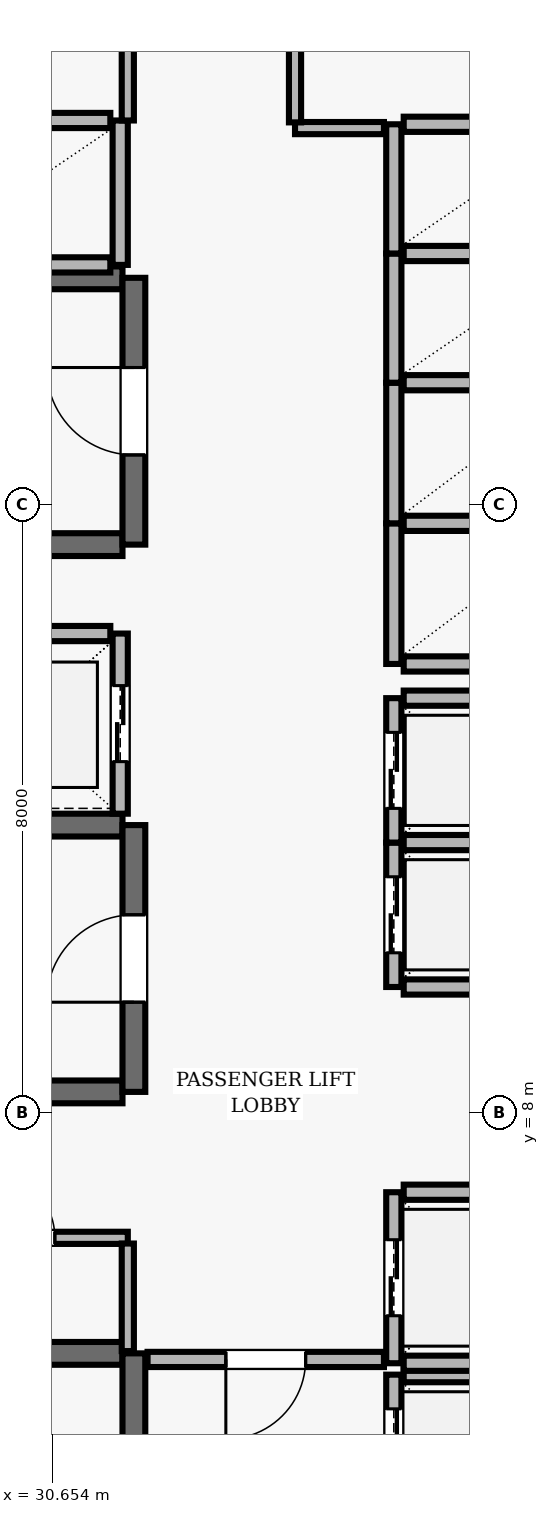
"""IFC4 building model, lengths in metres.
Left out: names, types, materials, properties, quantities, classifications, styles, units other than length and angle.
Written with IfcOpenShell. Run it as: python <this file> out.ifc"""

import sys

from ifc_helpers import new_model, si_unit, direction, frame, frame_2d, origin, place, context, subcontext, project, spatial, rectangle, extrude, element, fill, save


model = new_model("IFC4")
c1 = context("Model", 3, precision=1e-05, world=origin(), true_north=direction((0.0, 1.0)))
c2 = subcontext(c1, "Body", "Model", "MODEL_VIEW")
j1 = project(units=[si_unit("LENGTHUNIT", "METRE"), si_unit("PLANEANGLEUNIT", "RADIAN")], contexts=[c1])
p1 = place(None, origin())
s1 = spatial("IfcSite", under=j1, at=p1, CompositionType="ELEMENT")
p2 = place(p1, origin())
s2 = spatial("IfcBuilding", under=s1, at=p2, CompositionType="ELEMENT")
p3 = place(p2, frame((0.0, 0.0, 175.8)))
s3 = spatial("IfcBuildingStorey", under=s2, at=p3, CompositionType="ELEMENT", Elevation=175.8)
p4 = place(p3, frame((31.58, 4.83, 0.0), z_axis=(0.0, 0.0, 1.0), x_axis=(-1.0, 0.0, 0.0)))
e1 = element("IfcWall", 1, at=p4, inside=s3, PredefinedType="SHEAR", context=c2, shape_type="SweptSolid", body=[
    extrude(rectangle(XDim=8.36, YDim=0.3, at=frame_2d((4.18, 0.0))), origin(), (0.0, 0.0, 1.0), 3.69),
])
p5 = place(p3, frame((31.73, 0.96, 0.0), z_axis=(0.0, 0.0, 1.0), x_axis=(0.0, 1.0, 0.0)))
e2 = element("IfcWall", 2, at=p5, inside=s3, PredefinedType="SHEAR", context=c2, shape_type="SweptSolid", body=[
    extrude(rectangle(XDim=3.87, YDim=0.3, at=frame_2d((1.935, 0.0))), origin(), (0.0, 0.0, 1.0), 3.69),
])
p6 = place(p5, frame((1.54, 0.0, 0.0)))
e3 = element("IfcOpeningElement", 3, at=p6, cuts=e2, PredefinedType="OPENING", context=c2, shape_type="SweptSolid", body=[
    extrude(rectangle(XDim=1.15, YDim=2.15, at=frame_2d((0.575, 1.075))), frame((0.0, 0.16, 0.0), z_axis=(0.0, -1.0, 0.0), x_axis=(1.0, 0.0, 0.0)), (0.0, 0.0, 1.0), 0.32),
])
for number, where, z_axis, x_axis in (
    (4, (31.58, 18.98, 0.0), (0.0, 0.0, 1.0), (-1.0, 0.0, 0.0)),
    (5, (23.22, 15.47, 0.0), (0.0, 0.0, 1.0), (1.0, 0.0, 0.0)),
):
    element("IfcWall", number, at=place(p3, frame(where, z_axis=z_axis, x_axis=x_axis)), inside=s3, PredefinedType="SHEAR", context=c2, shape_type="SweptSolid", body=[
        extrude(rectangle(XDim=8.36, YDim=0.3, at=frame_2d((4.18, 0.0))), origin(), (0.0, 0.0, 1.0), 3.69),
    ])
p7 = place(p3, frame((31.73, 15.47, 0.0), z_axis=(0.0, 0.0, 1.0), x_axis=(0.0, 1.0, 0.0)))
e6 = element("IfcWall", 6, at=p7, inside=s3, PredefinedType="SHEAR", context=c2, shape_type="SweptSolid", body=[
    extrude(rectangle(XDim=3.51, YDim=0.3, at=frame_2d((1.755, 0.0))), origin(), (0.0, 0.0, 1.0), 3.69),
])
p8 = place(p7, frame((1.18, 0.0, 0.0)))
e7 = element("IfcOpeningElement", 7, at=p8, cuts=e6, PredefinedType="OPENING", context=c2, shape_type="SweptSolid", body=[
    extrude(rectangle(XDim=1.15, YDim=2.15, at=frame_2d((0.575, 1.075))), frame((0.0, 0.16, 0.0), z_axis=(0.0, -1.0, 0.0), x_axis=(1.0, 0.0, 0.0)), (0.0, 0.0, 1.0), 0.32),
])
for number, where, z_axis, x_axis in (
    (8, (31.58, 11.78, 0.0), (0.0, 0.0, 1.0), (-1.0, 0.0, 0.0)),
    (9, (23.22, 8.27, 0.0), (0.0, 0.0, 1.0), (1.0, 0.0, 0.0)),
):
    element("IfcWall", number, at=place(p3, frame(where, z_axis=z_axis, x_axis=x_axis)), inside=s3, PredefinedType="SHEAR", context=c2, shape_type="SweptSolid", body=[
        extrude(rectangle(XDim=8.36, YDim=0.3, at=frame_2d((4.18, 0.0))), origin(), (0.0, 0.0, 1.0), 3.69),
    ])
p9 = place(p3, frame((31.73, 8.27, 0.0), z_axis=(0.0, 0.0, 1.0), x_axis=(0.0, 1.0, 0.0)))
e10 = element("IfcWall", 10, at=p9, inside=s3, PredefinedType="SHEAR", context=c2, shape_type="SweptSolid", body=[
    extrude(rectangle(XDim=3.51, YDim=0.3, at=frame_2d((1.755, 0.0))), origin(), (0.0, 0.0, 1.0), 3.69),
])
p10 = place(p9, frame((1.18, 0.0, 0.0)))
e11 = element("IfcOpeningElement", 11, at=p10, cuts=e10, PredefinedType="OPENING", context=c2, shape_type="SweptSolid", body=[
    extrude(rectangle(XDim=1.15, YDim=2.15, at=frame_2d((0.575, 1.075))), frame((0.0, 0.16, 0.0), z_axis=(0.0, -1.0, 0.0), x_axis=(1.0, 0.0, 0.0)), (0.0, 0.0, 1.0), 0.32),
])
p11 = place(p3, frame((35.15, 4.55, 0.0), z_axis=(0.0, 0.0, 1.0), x_axis=(0.0, -1.0, 0.0)))
e12 = element("IfcWall", 12, at=p11, inside=s3, PredefinedType="SOLIDWALL", context=c2, shape_type="SweptSolid", body=[
    extrude(rectangle(XDim=2.1, YDim=0.2, at=frame_2d((1.05, 0.0))), origin(), (0.0, 0.0, 1.0), 3.69),
])
p12 = place(p11, frame((0.45, 0.0, 0.0)))
e13 = element("IfcOpeningElement", 13, at=p12, cuts=e12, PredefinedType="OPENING", context=c2, shape_type="SweptSolid", body=[
    extrude(rectangle(XDim=1.2, YDim=2.15, at=frame_2d((0.6, 1.075))), frame((0.0, 0.11, 0.0), z_axis=(0.0, -1.0, 0.0), x_axis=(1.0, 0.0, 0.0)), (0.0, 0.0, 1.0), 0.22),
])
p13 = place(p3, frame((37.42, 4.55, 0.0), z_axis=(0.0, 0.0, 1.0), x_axis=(-1.0, 0.0, 0.0)))
e14 = element("IfcWall", 14, at=p13, inside=s3, PredefinedType="SOLIDWALL", context=c2, shape_type="SweptSolid", body=[
    extrude(rectangle(XDim=2.14, YDim=0.2, at=frame_2d((1.07, 0.0))), origin(), (0.0, 0.0, 1.0), 3.69),
])
p14 = place(p3, frame((35.15, 6.95, 0.0), z_axis=(0.0, 0.0, 1.0), x_axis=(0.0, -1.0, 0.0)))
e15 = element("IfcWall", 15, at=p14, inside=s3, PredefinedType="SOLIDWALL", context=c2, shape_type="SweptSolid", body=[
    extrude(rectangle(XDim=2.25, YDim=0.2, at=frame_2d((1.125, 0.0))), origin(), (0.0, 0.0, 1.0), 3.69),
])
p15 = place(p14, frame((0.625, 0.0, 0.0)))
e16 = element("IfcOpeningElement", 16, at=p15, cuts=e15, PredefinedType="OPENING", context=c2, shape_type="SweptSolid", body=[
    extrude(rectangle(XDim=1.0, YDim=2.1, at=frame_2d((0.5, 1.05))), frame((0.0, 0.11, 0.0), z_axis=(0.0, -1.0, 0.0), x_axis=(1.0, 0.0, 0.0)), (0.0, 0.0, 1.0), 0.22),
])
for number, where, z_axis, x_axis in (
    (17, (35.28, 4.7, 0.0), (0.0, 0.0, 1.0), (1.0, 0.0, 0.0)),
    (18, (37.42, 6.95, 0.0), (0.0, 0.0, 1.0), (-1.0, 0.0, 0.0)),
):
    element("IfcWall", number, at=place(p3, frame(where, z_axis=z_axis, x_axis=x_axis)), inside=s3, PredefinedType="SOLIDWALL", context=c2, shape_type="SweptSolid", body=[
        extrude(rectangle(XDim=2.14, YDim=0.2, at=frame_2d((1.07, 0.0))), origin(), (0.0, 0.0, 1.0), 3.69),
    ])
p16 = place(p3, frame((35.15, 11.55, 0.0), z_axis=(0.0, 0.0, 1.0), x_axis=(0.0, -1.0, 0.0)))
e19 = element("IfcWall", 19, at=p16, inside=s3, PredefinedType="SOLIDWALL", context=c2, shape_type="SweptSolid", body=[
    extrude(rectangle(XDim=1.9, YDim=0.2, at=frame_2d((0.95, 0.0))), origin(), (0.0, 0.0, 1.0), 3.69),
])
p17 = place(p16, frame((0.45, 0.0, 0.0)))
e20 = element("IfcOpeningElement", 20, at=p17, cuts=e19, PredefinedType="OPENING", context=c2, shape_type="SweptSolid", body=[
    extrude(rectangle(XDim=1.0, YDim=2.1, at=frame_2d((0.5, 1.05))), frame((0.0, 0.11, 0.0), z_axis=(0.0, -1.0, 0.0), x_axis=(1.0, 0.0, 0.0)), (0.0, 0.0, 1.0), 0.22),
])
for number, where, z_axis, x_axis in (
    (21, (35.28, 9.65, 0.0), (0.0, 0.0, 1.0), (1.0, 0.0, 0.0)),
    (22, (37.42, 11.55, 0.0), (0.0, 0.0, 1.0), (-1.0, 0.0, 0.0)),
):
    element("IfcWall", number, at=place(p3, frame(where, z_axis=z_axis, x_axis=x_axis)), inside=s3, PredefinedType="SOLIDWALL", context=c2, shape_type="SweptSolid", body=[
        extrude(rectangle(XDim=2.14, YDim=0.2, at=frame_2d((1.07, 0.0))), origin(), (0.0, 0.0, 1.0), 3.69),
    ])
p18 = place(p3, frame((35.15, 13.45, 0.0), z_axis=(0.0, 0.0, 1.0), x_axis=(0.0, -1.0, 0.0)))
e23 = element("IfcWall", 23, at=p18, inside=s3, PredefinedType="SOLIDWALL", context=c2, shape_type="SweptSolid", body=[
    extrude(rectangle(XDim=1.9, YDim=0.2, at=frame_2d((0.95, 0.0))), origin(), (0.0, 0.0, 1.0), 3.69),
])
p19 = place(p18, frame((0.45, 0.0, 0.0)))
e24 = element("IfcOpeningElement", 24, at=p19, cuts=e23, PredefinedType="OPENING", context=c2, shape_type="SweptSolid", body=[
    extrude(rectangle(XDim=1.0, YDim=2.1, at=frame_2d((0.5, 1.05))), frame((0.0, 0.11, 0.0), z_axis=(0.0, -1.0, 0.0), x_axis=(1.0, 0.0, 0.0)), (0.0, 0.0, 1.0), 0.22),
])
p20 = place(p3, frame((37.42, 13.45, 0.0), z_axis=(0.0, 0.0, 1.0), x_axis=(-1.0, 0.0, 0.0)))
e25 = element("IfcWall", 25, at=p20, inside=s3, PredefinedType="SOLIDWALL", context=c2, shape_type="SweptSolid", body=[
    extrude(rectangle(XDim=2.14, YDim=0.2, at=frame_2d((1.07, 0.0))), origin(), (0.0, 0.0, 1.0), 3.69),
])
p21 = place(p3, frame((31.55, 11.93, 0.0), z_axis=(0.0, 0.0, 1.0), x_axis=(0.0, 1.0, 0.0)))
e26 = element("IfcWall", 26, at=p21, inside=s3, PredefinedType="SOLIDWALL", context=c2, shape_type="SweptSolid", body=[
    extrude(rectangle(XDim=2.37, YDim=0.2, at=frame_2d((1.185, 0.0))), origin(), (0.0, 0.0, 1.0), 3.69),
])
p22 = place(p21, frame((0.685, 0.0, 0.0)))
e27 = element("IfcOpeningElement", 27, at=p22, cuts=e26, PredefinedType="OPENING", context=c2, shape_type="SweptSolid", body=[
    extrude(rectangle(XDim=1.0, YDim=2.1, at=frame_2d((0.5, 1.05))), frame((0.0, 0.11, 0.0), z_axis=(0.0, -1.0, 0.0), x_axis=(1.0, 0.0, 0.0)), (0.0, 0.0, 1.0), 0.22),
])
p23 = place(p3, frame((31.42, 14.3, 0.0), z_axis=(0.0, 0.0, 1.0), x_axis=(-1.0, 0.0, 0.0)))
e28 = element("IfcWall", 28, at=p23, inside=s3, PredefinedType="SOLIDWALL", context=c2, shape_type="SweptSolid", body=[
    extrude(rectangle(XDim=2.44, YDim=0.2, at=frame_2d((1.22, 0.0))), origin(), (0.0, 0.0, 1.0), 3.69),
])
p24 = place(p3, frame((35.15, 15.75, 0.0), z_axis=(0.0, 0.0, 1.0), x_axis=(0.0, -1.0, 0.0)))
e29 = element("IfcWall", 29, at=p24, inside=s3, PredefinedType="SOLIDWALL", context=c2, shape_type="SweptSolid", body=[
    extrude(rectangle(XDim=1.85, YDim=0.2, at=frame_2d((0.925, 0.0))), origin(), (0.0, 0.0, 1.0), 3.69),
])
for number, where, z_axis, x_axis in (
    (30, (35.28, 13.9, 0.0), (0.0, 0.0, 1.0), (1.0, 0.0, 0.0)),
    (31, (37.42, 15.75, 0.0), (0.0, 0.0, 1.0), (-1.0, 0.0, 0.0)),
):
    element("IfcWall", number, at=place(p3, frame(where, z_axis=z_axis, x_axis=x_axis)), inside=s3, PredefinedType="SOLIDWALL", context=c2, shape_type="SweptSolid", body=[
        extrude(rectangle(XDim=2.14, YDim=0.2, at=frame_2d((1.07, 0.0))), origin(), (0.0, 0.0, 1.0), 3.69),
    ])
p25 = place(p3, frame((35.15, 17.6, 0.0), z_axis=(0.0, 0.0, 1.0), x_axis=(0.0, -1.0, 0.0)))
e32 = element("IfcWall", 32, at=p25, inside=s3, PredefinedType="SOLIDWALL", context=c2, shape_type="SweptSolid", body=[
    extrude(rectangle(XDim=1.85, YDim=0.2, at=frame_2d((0.925, 0.0))), origin(), (0.0, 0.0, 1.0), 3.69),
])
p26 = place(p3, frame((37.42, 17.6, 0.0), z_axis=(0.0, 0.0, 1.0), x_axis=(-1.0, 0.0, 0.0)))
e33 = element("IfcWall", 33, at=p26, inside=s3, PredefinedType="SOLIDWALL", context=c2, shape_type="SweptSolid", body=[
    extrude(rectangle(XDim=2.14, YDim=0.2, at=frame_2d((1.07, 0.0))), origin(), (0.0, 0.0, 1.0), 3.69),
])
p27 = place(p3, frame((35.15, 19.3, 0.0), z_axis=(0.0, 0.0, 1.0), x_axis=(0.0, -1.0, 0.0)))
e34 = element("IfcWall", 34, at=p27, inside=s3, PredefinedType="SOLIDWALL", context=c2, shape_type="SweptSolid", body=[
    extrude(rectangle(XDim=1.7, YDim=0.2, at=frame_2d((0.85, 0.0))), origin(), (0.0, 0.0, 1.0), 3.69),
])
p28 = place(p3, frame((37.42, 19.3, 0.0), z_axis=(0.0, 0.0, 1.0), x_axis=(-1.0, 0.0, 0.0)))
e35 = element("IfcWall", 35, at=p28, inside=s3, PredefinedType="SOLIDWALL", context=c2, shape_type="SweptSolid", body=[
    extrude(rectangle(XDim=2.14, YDim=0.2, at=frame_2d((1.07, 0.0))), origin(), (0.0, 0.0, 1.0), 3.69),
])
p29 = place(p3, frame((35.15, 21.0, 0.0), z_axis=(0.0, 0.0, 1.0), x_axis=(0.0, -1.0, 0.0)))
e36 = element("IfcWall", 36, at=p29, inside=s3, PredefinedType="SOLIDWALL", context=c2, shape_type="SweptSolid", body=[
    extrude(rectangle(XDim=1.7, YDim=0.2, at=frame_2d((0.85, 0.0))), origin(), (0.0, 0.0, 1.0), 3.69),
])
p30 = place(p3, frame((37.42, 21.0, 0.0), z_axis=(0.0, 0.0, 1.0), x_axis=(-1.0, 0.0, 0.0)))
e37 = element("IfcWall", 37, at=p30, inside=s3, PredefinedType="SOLIDWALL", context=c2, shape_type="SweptSolid", body=[
    extrude(rectangle(XDim=2.14, YDim=0.2, at=frame_2d((1.07, 0.0))), origin(), (0.0, 0.0, 1.0), 3.69),
])
p31 = place(p3, frame((31.55, 19.15, 0.0), z_axis=(0.0, 0.0, 1.0), x_axis=(0.0, 1.0, 0.0)))
e38 = element("IfcWall", 38, at=p31, inside=s3, PredefinedType="SOLIDWALL", context=c2, shape_type="SweptSolid", body=[
    extrude(rectangle(XDim=1.9, YDim=0.2, at=frame_2d((0.95, 0.0))), origin(), (0.0, 0.0, 1.0), 3.69),
])
for number, where, z_axis, x_axis in (
    (39, (28.98, 19.15, 0.0), (0.0, 0.0, 1.0), (1.0, 0.0, 0.0)),
    (40, (31.42, 21.05, 0.0), (0.0, 0.0, 1.0), (-1.0, 0.0, 0.0)),
):
    element("IfcWall", number, at=place(p3, frame(where, z_axis=z_axis, x_axis=x_axis)), inside=s3, PredefinedType="SOLIDWALL", context=c2, shape_type="SweptSolid", body=[
        extrude(rectangle(XDim=2.44, YDim=0.2, at=frame_2d((1.22, 0.0))), origin(), (0.0, 0.0, 1.0), 3.69),
    ])
p32 = place(p3, frame((28.85, 6.35, 0.0), z_axis=(0.0, 0.0, 1.0), x_axis=(1.0, 0.0, 0.0)))
e41 = element("IfcWall", 41, at=p32, inside=s3, PredefinedType="PARTITIONING", context=c2, shape_type="SweptSolid", body=[
    extrude(rectangle(XDim=2.8, YDim=0.16, at=frame_2d((1.4, 0.0))), origin(), (0.0, 0.0, 1.0), 3.69),
])
p33 = place(p32, frame((0.96, 0.0, 0.0)))
e42 = element("IfcOpeningElement", 42, at=p33, cuts=e41, PredefinedType="OPENING", context=c2, shape_type="SweptSolid", body=[
    extrude(rectangle(XDim=0.88, YDim=2.1, at=frame_2d((0.44, 1.05))), frame((0.0, 0.09, 0.0), z_axis=(0.0, -1.0, 0.0), x_axis=(1.0, 0.0, 0.0)), (0.0, 0.0, 1.0), 0.18),
])
p34 = place(p3, frame((35.02, 4.75, 0.0), z_axis=(0.0, 0.0, 1.0), x_axis=(-1.0, 0.0, 0.0)))
e43 = element("IfcWall", 43, at=p34, inside=s3, PredefinedType="SOLIDWALL", context=c2, shape_type="SweptSolid", body=[
    extrude(rectangle(XDim=3.11, YDim=0.2, at=frame_2d((1.555, 0.0))), origin(), (0.0, 0.0, 1.0), 3.69),
])
p35 = place(p34, frame((1.03, 0.0, 0.0)))
e44 = element("IfcOpeningElement", 44, at=p35, cuts=e43, PredefinedType="OPENING", context=c2, shape_type="SweptSolid", body=[
    extrude(rectangle(XDim=1.05, YDim=2.15, at=frame_2d((0.525, 1.075))), frame((0.0, 0.11, 0.0), z_axis=(0.0, -1.0, 0.0), x_axis=(1.0, 0.0, 0.0)), (0.0, 0.0, 1.0), 0.22),
])
p36 = place(p3, frame((35.02, 20.95, 0.0), z_axis=(0.0, 0.0, 1.0), x_axis=(-1.0, 0.0, 0.0)))
e45 = element("IfcWall", 45, at=p36, inside=s3, PredefinedType="PARTITIONING", context=c2, shape_type="SweptSolid", body=[
    extrude(rectangle(XDim=1.17, YDim=0.16, at=frame_2d((0.585, 0.0))), origin(), (0.0, 0.0, 1.0), 3.69),
])
p37 = place(p3, frame((31.65, 4.86, 0.0), z_axis=(0.0, 0.0, 1.0), x_axis=(0.0, 1.0, 0.0)))
e46 = element("IfcWall", 46, at=p37, inside=s3, PredefinedType="PARTITIONING", context=c2, shape_type="SweptSolid", body=[
    extrude(rectangle(XDim=1.415, YDim=0.16, at=frame_2d((0.708, 0.0))), origin(), (0.0, 0.0, 1.0), 3.69),
])
p38 = place(p3, frame((31.65, 23.775, 0.0), z_axis=(0.0, 0.0, 1.0), x_axis=(0.0, -1.0, 0.0)))
e47 = element("IfcWall", 47, at=p38, inside=s3, PredefinedType="PARTITIONING", context=c2, shape_type="SweptSolid", body=[
    extrude(rectangle(XDim=2.725, YDim=0.16, at=frame_2d((1.362, 0.0))), origin(), (0.0, 0.0, 1.0), 3.69),
])
p39 = place(p3, frame((33.85, 21.025, 0.0), z_axis=(0.0, 0.0, 1.0), x_axis=(0.0, 1.0, 0.0)))
e48 = element("IfcWall", 48, at=p39, inside=s3, PredefinedType="PARTITIONING", context=c2, shape_type="SweptSolid", body=[
    extrude(rectangle(XDim=2.75, YDim=0.16, at=frame_2d((1.375, 0.0))), origin(), (0.0, 0.0, 1.0), 3.69),
])
p40 = place(p8, origin())
e49 = element("IfcDoor", 49, at=p40, inside=s3, OperationType="SINGLE_SWING_RIGHT", PredefinedType="DOOR", context=c2, shape_type="SweptSolid", body=[
    extrude(rectangle(XDim=1.15, YDim=2.15, at=frame_2d((0.575, 1.075))), frame((0.0, 0.025, 0.0), z_axis=(0.0, -1.0, 0.0), x_axis=(1.0, 0.0, 0.0)), (0.0, 0.0, 1.0), 0.05),
])
fill(e7, e49)
p41 = place(p10, origin())
e50 = element("IfcDoor", 50, at=p41, inside=s3, OperationType="SINGLE_SWING_LEFT", PredefinedType="DOOR", context=c2, shape_type="SweptSolid", body=[
    extrude(rectangle(XDim=1.15, YDim=2.15, at=frame_2d((0.575, 1.075))), frame((0.0, 0.025, 0.0), z_axis=(0.0, -1.0, 0.0), x_axis=(1.0, 0.0, 0.0)), (0.0, 0.0, 1.0), 0.05),
])
fill(e11, e50)
p42 = place(p12, origin())
e51 = element("IfcDoor", 51, at=p42, inside=s3, OperationType="DOUBLE_DOOR_SLIDING", PredefinedType="DOOR", context=c2, shape_type="SweptSolid", body=[
    extrude(rectangle(XDim=1.2, YDim=2.15, at=frame_2d((0.6, 1.075))), frame((0.0, 0.025, 0.0), z_axis=(0.0, -1.0, 0.0), x_axis=(1.0, 0.0, 0.0)), (0.0, 0.0, 1.0), 0.05),
])
fill(e13, e51)
p43 = place(p15, origin())
e52 = element("IfcDoor", 52, at=p43, inside=s3, OperationType="DOUBLE_DOOR_SLIDING", PredefinedType="DOOR", context=c2, shape_type="SweptSolid", body=[
    extrude(rectangle(XDim=1.0, YDim=2.1, at=frame_2d((0.5, 1.05))), frame((0.0, 0.025, 0.0), z_axis=(0.0, -1.0, 0.0), x_axis=(1.0, 0.0, 0.0)), (0.0, 0.0, 1.0), 0.05),
])
fill(e16, e52)
p44 = place(p17, origin())
e53 = element("IfcDoor", 53, at=p44, inside=s3, OperationType="DOUBLE_DOOR_SLIDING", PredefinedType="DOOR", context=c2, shape_type="SweptSolid", body=[
    extrude(rectangle(XDim=1.0, YDim=2.1, at=frame_2d((0.5, 1.05))), frame((0.0, 0.025, 0.0), z_axis=(0.0, -1.0, 0.0), x_axis=(1.0, 0.0, 0.0)), (0.0, 0.0, 1.0), 0.05),
])
fill(e20, e53)
p45 = place(p19, origin())
e54 = element("IfcDoor", 54, at=p45, inside=s3, OperationType="DOUBLE_DOOR_SLIDING", PredefinedType="DOOR", context=c2, shape_type="SweptSolid", body=[
    extrude(rectangle(XDim=1.0, YDim=2.1, at=frame_2d((0.5, 1.05))), frame((0.0, 0.025, 0.0), z_axis=(0.0, -1.0, 0.0), x_axis=(1.0, 0.0, 0.0)), (0.0, 0.0, 1.0), 0.05),
])
fill(e24, e54)
p46 = place(p22, origin())
e55 = element("IfcDoor", 55, at=p46, inside=s3, OperationType="DOUBLE_DOOR_SLIDING", PredefinedType="DOOR", context=c2, shape_type="SweptSolid", body=[
    extrude(rectangle(XDim=1.0, YDim=2.1, at=frame_2d((0.5, 1.05))), frame((0.0, 0.025, 0.0), z_axis=(0.0, -1.0, 0.0), x_axis=(1.0, 0.0, 0.0)), (0.0, 0.0, 1.0), 0.05),
])
fill(e27, e55)
p47 = place(p35, origin())
e56 = element("IfcDoor", 56, at=p47, inside=s3, OperationType="SINGLE_SWING_RIGHT", PredefinedType="DOOR", context=c2, shape_type="SweptSolid", body=[
    extrude(rectangle(XDim=1.05, YDim=2.15, at=frame_2d((0.525, 1.075))), frame((0.0, 0.025, 0.0), z_axis=(0.0, -1.0, 0.0), x_axis=(1.0, 0.0, 0.0)), (0.0, 0.0, 1.0), 0.05),
])
fill(e44, e56)
p48 = place(p33, origin())
e57 = element("IfcDoor", 57, at=p48, inside=s3, OperationType="SINGLE_SWING_LEFT", PredefinedType="DOOR", context=c2, shape_type="SweptSolid", body=[
    extrude(rectangle(XDim=0.88, YDim=2.1, at=frame_2d((0.44, 1.05))), frame((0.0, 0.025, 0.0), z_axis=(0.0, -1.0, 0.0), x_axis=(1.0, 0.0, 0.0)), (0.0, 0.0, 1.0), 0.05),
])
fill(e42, e57)
save(model, sys.argv[1])
